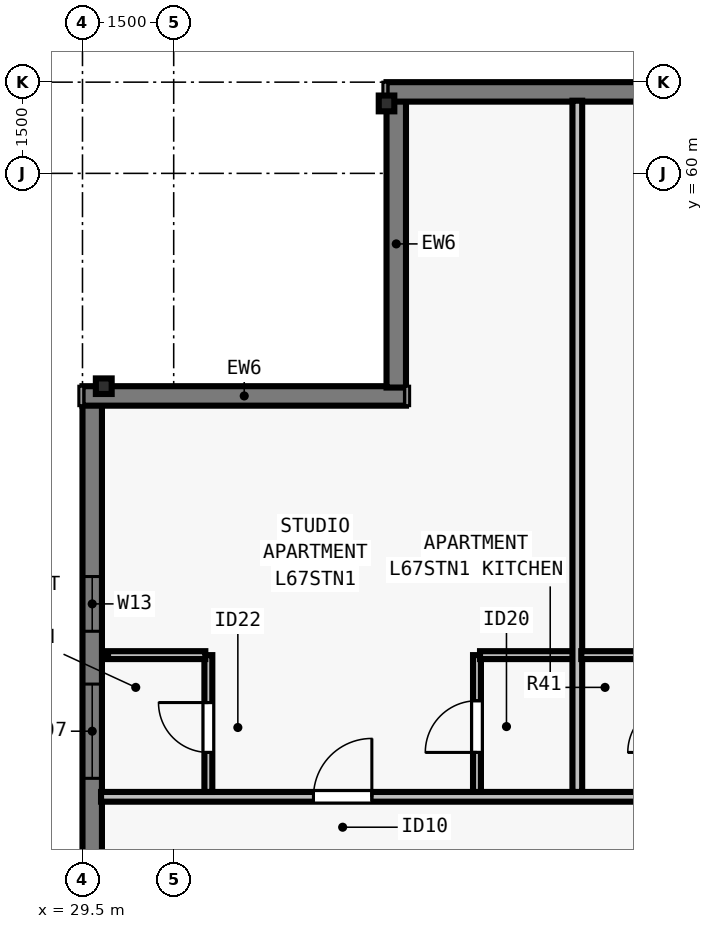
"""IFC4 building model, lengths in metres.
Left out: names, types, materials, properties, quantities, classifications, styles, units other than length and angle.
Written with IfcOpenShell. Run it as: python <this file> out.ifc"""

import sys

from ifc_helpers import new_model, si_unit, direction, frame, frame_2d, origin, origin_2d, place, context, subcontext, project, spatial, rectangle, i_section, extrude, element, fill, save


model = new_model("IFC4")
c1 = context("Model", 3, precision=1e-05, world=origin(), true_north=direction((0.0, 1.0)))
c2 = subcontext(c1, "Body", "Model", "MODEL_VIEW")
j1 = project(units=[si_unit("LENGTHUNIT", "METRE"), si_unit("PLANEANGLEUNIT", "RADIAN")], contexts=[c1])
p1 = place(None, origin())
s1 = spatial("IfcSite", under=j1, at=p1, CompositionType="ELEMENT")
p2 = place(p1, origin())
s2 = spatial("IfcBuilding", under=s1, at=p2, CompositionType="ELEMENT")
p3 = place(p2, frame((0.0, 0.0, 244.5)))
s3 = spatial("IfcBuildingStorey", under=s2, at=p3, CompositionType="ELEMENT", Elevation=244.5)
for number, where, z_axis, x_axis in (
    (1, (34.5, 61.15, 0.0), (0.0, 0.0, 1.0), (1.0, 0.0, 0.0)),
    (2, (29.85, 56.5, 0.0), (0.0, 0.0, 1.0), (0.0, 1.0, 0.0)),
):
    element("IfcColumn", number, at=place(p3, frame(where, z_axis=z_axis, x_axis=x_axis)), inside=s3, PredefinedType="COLUMN", context=c2, shape_type="SweptSolid", body=[
        extrude(i_section(OverallWidth=0.256, OverallDepth=0.26, WebThickness=0.01, FlangeThickness=0.017, FilletRadius=0.013, at=origin_2d()), origin(), (0.0, 0.0, 1.0), 3.5),
    ])
p4 = place(p3, frame((29.66, 43.2, 0.0), z_axis=(0.0, 0.0, 1.0), x_axis=(0.0, 1.0, 0.0)))
e3 = element("IfcWall", 3, at=p4, inside=s3, PredefinedType="SOLIDWALL", context=c2, shape_type="SweptSolid", body=[
    extrude(rectangle(XDim=13.002, YDim=0.32, at=frame_2d((6.501, 0.0))), origin(), (0.0, 0.0, 1.0), 3.29),
])
p5 = place(p4, frame((1.851, 0.0, 0.8)))
e4 = element("IfcOpeningElement", 4, at=p5, cuts=e3, PredefinedType="OPENING", context=c2, shape_type="SweptSolid", body=[
    extrude(rectangle(XDim=1.85, YDim=1.678, at=frame_2d((0.925, 0.839))), frame((0.0, 0.17, 0.0), z_axis=(0.0, -1.0, 0.0), x_axis=(1.0, 0.0, 0.0)), (0.0, 0.0, 1.0), 0.34),
])
p6 = place(p4, frame((6.852, 0.0, 0.8)))
e5 = element("IfcOpeningElement", 5, at=p6, cuts=e3, PredefinedType="OPENING", context=c2, shape_type="SweptSolid", body=[
    extrude(rectangle(XDim=1.55, YDim=1.678, at=frame_2d((0.775, 0.839))), frame((0.0, 0.17, 0.0), z_axis=(0.0, -1.0, 0.0), x_axis=(1.0, 0.0, 0.0)), (0.0, 0.0, 1.0), 0.34),
])
p7 = place(p4, frame((9.27, 0.0, 0.8)))
e6 = element("IfcOpeningElement", 6, at=p7, cuts=e3, PredefinedType="OPENING", context=c2, shape_type="SweptSolid", body=[
    extrude(rectangle(XDim=0.9, YDim=1.678, at=frame_2d((0.45, 0.839))), frame((0.0, 0.17, 0.0), z_axis=(0.0, -1.0, 0.0), x_axis=(1.0, 0.0, 0.0)), (0.0, 0.0, 1.0), 0.34),
])
p8 = place(p3, frame((29.5, 56.34, 0.0), z_axis=(0.0, 0.0, 1.0), x_axis=(1.0, 0.0, 0.0)))
e7 = element("IfcWall", 7, at=p8, inside=s3, PredefinedType="SOLIDWALL", context=c2, shape_type="SweptSolid", body=[
    extrude(rectangle(XDim=5.32, YDim=0.32, at=frame_2d((2.66, 0.0))), origin(), (0.0, 0.0, 1.0), 3.29),
])
p9 = place(p3, frame((34.66, 56.478, 0.0), z_axis=(0.0, 0.0, 1.0), x_axis=(0.0, 1.0, 0.0)))
e8 = element("IfcWall", 8, at=p9, inside=s3, PredefinedType="SOLIDWALL", context=c2, shape_type="SweptSolid", body=[
    extrude(rectangle(XDim=4.724, YDim=0.32, at=frame_2d((2.362, 0.0))), origin(), (0.0, 0.0, 1.0), 3.29),
])
p10 = place(p3, frame((34.5, 61.34, 0.0), z_axis=(0.0, 0.0, 1.0), x_axis=(1.0, 0.0, 0.0)))
e9 = element("IfcWall", 9, at=p10, inside=s3, PredefinedType="SOLIDWALL", context=c2, shape_type="SweptSolid", body=[
    extrude(rectangle(XDim=34.702, YDim=0.32, at=frame_2d((17.351, 0.0))), origin(), (0.0, 0.0, 1.0), 3.29),
])
p11 = place(p10, frame((4.613, 0.0, 0.8)))
e10 = element("IfcOpeningElement", 10, at=p11, cuts=e9, PredefinedType="OPENING", context=c2, shape_type="SweptSolid", body=[
    extrude(rectangle(XDim=1.85, YDim=1.678, at=frame_2d((0.925, 0.839))), frame((0.0, 0.17, 0.0), z_axis=(0.0, -1.0, 0.0), x_axis=(1.0, 0.0, 0.0)), (0.0, 0.0, 1.0), 0.34),
])
p12 = place(p10, frame((7.688, 0.0, 0.8)))
e11 = element("IfcOpeningElement", 11, at=p12, cuts=e9, PredefinedType="OPENING", context=c2, shape_type="SweptSolid", body=[
    extrude(rectangle(XDim=1.55, YDim=1.678, at=frame_2d((0.775, 0.839))), frame((0.0, 0.17, 0.0), z_axis=(0.0, -1.0, 0.0), x_axis=(1.0, 0.0, 0.0)), (0.0, 0.0, 1.0), 0.34),
])
p13 = place(p10, frame((14.888, 0.0, 0.8)))
e12 = element("IfcOpeningElement", 12, at=p13, cuts=e9, PredefinedType="OPENING", context=c2, shape_type="SweptSolid", body=[
    extrude(rectangle(XDim=1.55, YDim=1.678, at=frame_2d((0.775, 0.839))), frame((0.0, 0.17, 0.0), z_axis=(0.0, -1.0, 0.0), x_axis=(1.0, 0.0, 0.0)), (0.0, 0.0, 1.0), 0.34),
])
p14 = place(p10, frame((18.564, 0.0, 0.8)))
e13 = element("IfcOpeningElement", 13, at=p14, cuts=e9, PredefinedType="OPENING", context=c2, shape_type="SweptSolid", body=[
    extrude(rectangle(XDim=1.85, YDim=1.678, at=frame_2d((0.925, 0.839))), frame((0.0, 0.17, 0.0), z_axis=(0.0, -1.0, 0.0), x_axis=(1.0, 0.0, 0.0)), (0.0, 0.0, 1.0), 0.34),
])
p15 = place(p10, frame((25.314, 0.0, 0.8)))
e14 = element("IfcOpeningElement", 14, at=p15, cuts=e9, PredefinedType="OPENING", context=c2, shape_type="SweptSolid", body=[
    extrude(rectangle(XDim=1.85, YDim=1.678, at=frame_2d((0.925, 0.839))), frame((0.0, 0.17, 0.0), z_axis=(0.0, -1.0, 0.0), x_axis=(1.0, 0.0, 0.0)), (0.0, 0.0, 1.0), 0.34),
])
p16 = place(p10, frame((28.389, 0.0, 0.8)))
e15 = element("IfcOpeningElement", 15, at=p16, cuts=e9, PredefinedType="OPENING", context=c2, shape_type="SweptSolid", body=[
    extrude(rectangle(XDim=1.55, YDim=1.678, at=frame_2d((0.775, 0.839))), frame((0.0, 0.17, 0.0), z_axis=(0.0, -1.0, 0.0), x_axis=(1.0, 0.0, 0.0)), (0.0, 0.0, 1.0), 0.34),
])
p17 = place(p3, frame((29.805, 49.748, 0.0), z_axis=(0.0, 0.0, 1.0), x_axis=(1.0, 0.0, 0.0)))
e16 = element("IfcWall", 16, at=p17, inside=s3, PredefinedType="PARTITIONING", context=c2, shape_type="SweptSolid", body=[
    extrude(rectangle(XDim=44.39, YDim=0.16, at=frame_2d((22.195, 0.0))), origin(), (0.0, 0.0, 1.0), 2.958),
])
p18 = place(p17, frame((3.494, 0.0, 0.0)))
e17 = element("IfcOpeningElement", 17, at=p18, cuts=e16, PredefinedType="OPENING", context=c2, shape_type="SweptSolid", body=[
    extrude(rectangle(XDim=0.96, YDim=2.18, at=frame_2d((0.48, 1.09))), frame((0.0, 0.09, 0.0), z_axis=(0.0, -1.0, 0.0), x_axis=(1.0, 0.0, 0.0)), (0.0, 0.0, 1.0), 0.18),
])
p19 = place(p17, frame((10.73, 0.0, 0.0)))
e18 = element("IfcOpeningElement", 18, at=p19, cuts=e16, PredefinedType="OPENING", context=c2, shape_type="SweptSolid", body=[
    extrude(rectangle(XDim=0.96, YDim=2.18, at=frame_2d((0.48, 1.09))), frame((0.0, 0.09, 0.0), z_axis=(0.0, -1.0, 0.0), x_axis=(1.0, 0.0, 0.0)), (0.0, 0.0, 1.0), 0.18),
])
p20 = place(p17, frame((18.09, 0.0, 0.0)))
e19 = element("IfcOpeningElement", 19, at=p20, cuts=e16, PredefinedType="OPENING", context=c2, shape_type="SweptSolid", body=[
    extrude(rectangle(XDim=0.96, YDim=2.18, at=frame_2d((0.48, 1.09))), frame((0.0, 0.09, 0.0), z_axis=(0.0, -1.0, 0.0), x_axis=(1.0, 0.0, 0.0)), (0.0, 0.0, 1.0), 0.18),
])
p21 = place(p17, frame((25.45, 0.0, 0.0)))
e20 = element("IfcOpeningElement", 20, at=p21, cuts=e16, PredefinedType="OPENING", context=c2, shape_type="SweptSolid", body=[
    extrude(rectangle(XDim=0.96, YDim=2.18, at=frame_2d((0.48, 1.09))), frame((0.0, 0.09, 0.0), z_axis=(0.0, -1.0, 0.0), x_axis=(1.0, 0.0, 0.0)), (0.0, 0.0, 1.0), 0.18),
])
p22 = place(p17, frame((32.81, 0.0, 0.0)))
e21 = element("IfcOpeningElement", 21, at=p22, cuts=e16, PredefinedType="OPENING", context=c2, shape_type="SweptSolid", body=[
    extrude(rectangle(XDim=0.96, YDim=2.18, at=frame_2d((0.48, 1.09))), frame((0.0, 0.09, 0.0), z_axis=(0.0, -1.0, 0.0), x_axis=(1.0, 0.0, 0.0)), (0.0, 0.0, 1.0), 0.18),
])
p23 = place(p17, frame((40.294, 0.0, 0.0)))
e22 = element("IfcOpeningElement", 22, at=p23, cuts=e16, PredefinedType="OPENING", context=c2, shape_type="SweptSolid", body=[
    extrude(rectangle(XDim=0.96, YDim=2.18, at=frame_2d((0.48, 1.09))), frame((0.0, 0.09, 0.0), z_axis=(0.0, -1.0, 0.0), x_axis=(1.0, 0.0, 0.0)), (0.0, 0.0, 1.0), 0.18),
])
p24 = place(p3, frame((31.57, 49.827, 0.0), z_axis=(0.0, 0.0, 1.0), x_axis=(0.0, 1.0, 0.0)))
e23 = element("IfcWall", 23, at=p24, inside=s3, PredefinedType="PLUMBINGWALL", context=c2, shape_type="SweptSolid", body=[
    extrude(rectangle(XDim=2.25, YDim=0.13, at=frame_2d((1.125, 0.0))), origin(), (0.0, 0.0, 1.0), 3.29),
])
p25 = place(p24, frame((0.65, 0.0, 0.0)))
e24 = element("IfcOpeningElement", 24, at=p25, cuts=e23, PredefinedType="OPENING", context=c2, shape_type="SweptSolid", body=[
    extrude(rectangle(XDim=0.82, YDim=2.1, at=frame_2d((0.41, 1.05))), frame((0.0, 0.075, 0.0), z_axis=(0.0, -1.0, 0.0), x_axis=(1.0, 0.0, 0.0)), (0.0, 0.0, 1.0), 0.15),
])
p26 = place(p3, frame((29.92, 52.077, 0.0), z_axis=(0.0, 0.0, 1.0), x_axis=(1.0, 0.0, 0.0)))
e25 = element("IfcWall", 25, at=p26, inside=s3, PredefinedType="PLUMBINGWALL", context=c2, shape_type="SweptSolid", body=[
    extrude(rectangle(XDim=1.6, YDim=0.13, at=frame_2d((0.8, 0.0))), origin(), (0.0, 0.0, 1.0), 3.29),
])
p27 = place(p3, frame((35.988, 49.827, 0.0), z_axis=(0.0, 0.0, 1.0), x_axis=(0.0, 1.0, 0.0)))
e26 = element("IfcWall", 26, at=p27, inside=s3, PredefinedType="PLUMBINGWALL", context=c2, shape_type="SweptSolid", body=[
    extrude(rectangle(XDim=2.25, YDim=0.13, at=frame_2d((1.125, 0.0))), origin(), (0.0, 0.0, 1.0), 3.29),
])
p28 = place(p27, frame((0.65, 0.0, 0.0)))
e27 = element("IfcOpeningElement", 27, at=p28, cuts=e26, PredefinedType="OPENING", context=c2, shape_type="SweptSolid", body=[
    extrude(rectangle(XDim=0.85, YDim=2.1, at=frame_2d((0.425, 1.05))), frame((0.0, 0.075, 0.0), z_axis=(0.0, -1.0, 0.0), x_axis=(1.0, 0.0, 0.0)), (0.0, 0.0, 1.0), 0.15),
])
p29 = place(p3, frame((36.038, 52.077, 0.0), z_axis=(0.0, 0.0, 1.0), x_axis=(1.0, 0.0, 0.0)))
e28 = element("IfcWall", 28, at=p29, inside=s3, PredefinedType="PLUMBINGWALL", context=c2, shape_type="SweptSolid", body=[
    extrude(rectangle(XDim=1.6, YDim=0.13, at=frame_2d((0.8, 0.0))), origin(), (0.0, 0.0, 1.0), 2.958),
])
p30 = place(p3, frame((37.637, 49.827, 0.0), z_axis=(0.0, 0.0, 1.0), x_axis=(0.0, 1.0, 0.0)))
e29 = element("IfcWall", 29, at=p30, inside=s3, PredefinedType="PARTITIONING", context=c2, shape_type="SweptSolid", body=[
    extrude(rectangle(XDim=11.368, YDim=0.16, at=frame_2d((5.684, 0.0))), origin(), (0.0, 0.0, 1.0), 2.573),
])
p31 = place(p3, frame((37.702, 52.077, 0.0), z_axis=(0.0, 0.0, 1.0), x_axis=(1.0, 0.0, 0.0)))
e30 = element("IfcWall", 30, at=p31, inside=s3, PredefinedType="PLUMBINGWALL", context=c2, shape_type="SweptSolid", body=[
    extrude(rectangle(XDim=1.535, YDim=0.13, at=frame_2d((0.768, 0.0))), origin(), (0.0, 0.0, 1.0), 3.29),
])
p32 = place(p6, origin())
e31 = element("IfcWindow", 31, at=p32, inside=s3, PartitioningType="SINGLE_PANEL", PredefinedType="WINDOW", context=c2, shape_type="SweptSolid", body=[
    extrude(rectangle(XDim=1.55, YDim=1.678, at=frame_2d((0.775, 0.839))), frame((0.0, -0.05, 0.0), z_axis=(0.0, -1.0, 0.0), x_axis=(1.0, 0.0, 0.0)), (0.0, 0.0, 1.0), 0.06),
])
fill(e5, e31)
p33 = place(p7, origin())
e32 = element("IfcWindow", 32, at=p33, inside=s3, PartitioningType="SINGLE_PANEL", PredefinedType="WINDOW", context=c2, shape_type="SweptSolid", body=[
    extrude(rectangle(XDim=0.9, YDim=1.678, at=frame_2d((0.45, 0.839))), frame((0.0, -0.04, 0.0), z_axis=(0.0, -1.0, 0.0), x_axis=(1.0, 0.0, 0.0)), (0.0, 0.0, 1.0), 0.06),
])
fill(e6, e32)
p34 = place(p25, origin())
e33 = element("IfcDoor", 33, at=p34, inside=s3, OperationType="SINGLE_SWING_RIGHT", PredefinedType="DOOR", context=c2, shape_type="SweptSolid", body=[
    extrude(rectangle(XDim=0.82, YDim=2.1, at=frame_2d((0.41, 1.05))), frame((0.0, 0.025, 0.0), z_axis=(0.0, -1.0, 0.0), x_axis=(1.0, 0.0, 0.0)), (0.0, 0.0, 1.0), 0.05),
])
fill(e24, e33)
p35 = place(p28, origin())
e34 = element("IfcDoor", 34, at=p35, inside=s3, OperationType="SINGLE_SWING_LEFT", PredefinedType="DOOR", context=c2, shape_type="SweptSolid", body=[
    extrude(rectangle(XDim=0.85, YDim=2.1, at=frame_2d((0.425, 1.05))), frame((0.0, 0.025, 0.0), z_axis=(0.0, -1.0, 0.0), x_axis=(1.0, 0.0, 0.0)), (0.0, 0.0, 1.0), 0.05),
])
fill(e27, e34)
p36 = place(p18, origin())
e35 = element("IfcDoor", 35, at=p36, inside=s3, OperationType="SINGLE_SWING_RIGHT", PredefinedType="DOOR", context=c2, shape_type="SweptSolid", body=[
    extrude(rectangle(XDim=0.96, YDim=2.18, at=frame_2d((0.48, 1.09))), frame((0.0, 0.025, 0.0), z_axis=(0.0, -1.0, 0.0), x_axis=(1.0, 0.0, 0.0)), (0.0, 0.0, 1.0), 0.05),
])
fill(e17, e35)
save(model, sys.argv[1])
